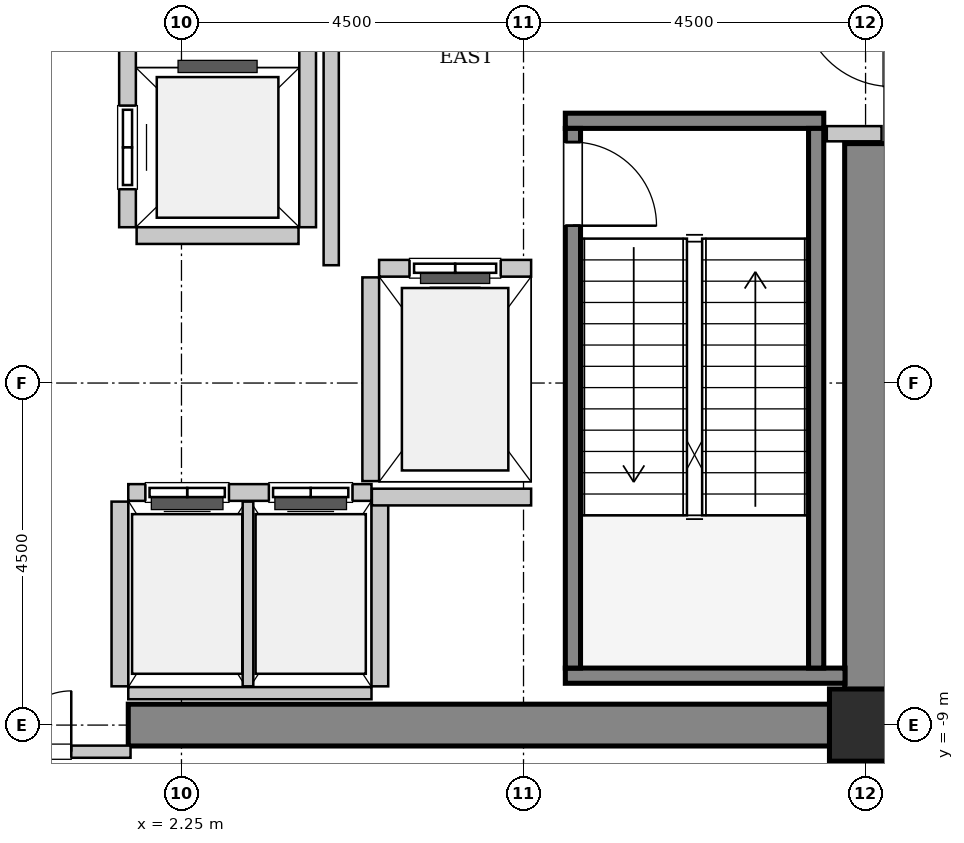
"""IFC4 building model, lengths in metres.
Left out: names, types, materials, properties, quantities, classifications, styles, units other than length and angle.
Written with IfcOpenShell. Run it as: python <this file> out.ifc"""

import sys

from ifc_helpers import new_model, si_unit, direction, frame, frame_2d, origin, origin_2d, place, context, subcontext, project, spatial, rectangle, hollow_rectangle, extrude, source, transform, mapped, element, fill, save


model = new_model("IFC4")
c1 = context("Model", 3, precision=1e-05, world=origin(), true_north=direction((0.0, 1.0)))
c2 = subcontext(c1, "Body", "Model", "MODEL_VIEW")
j1 = project(units=[si_unit("LENGTHUNIT", "METRE"), si_unit("PLANEANGLEUNIT", "RADIAN")], contexts=[c1])
p1 = place(None, origin())
s1 = spatial("IfcSite", under=j1, at=p1, CompositionType="ELEMENT")
p2 = place(p1, origin())
s2 = spatial("IfcBuilding", under=s1, at=p2, CompositionType="ELEMENT")
p3 = place(p2, frame((0.0, 0.0, 144.0)))
s3 = spatial("IfcBuildingStorey", under=s2, at=p3, CompositionType="ELEMENT", Elevation=144.0)
m1 = source(origin(), c2, "Body", "SweptSolid", [
    extrude(rectangle(XDim=9.975, YDim=0.55, at=frame_2d((4.987, 0.0))), origin(), (0.0, 0.0, 1.0), 4.8),
])
p4 = place(p3, frame((1.55, -9.0, 0.0), z_axis=(0.0, 0.0, 1.0), x_axis=(1.0, 0.0, 0.0)))
e1 = element("IfcWall", 1, at=p4, inside=s3, PredefinedType="SHEAR", context=c2, shape_type="MappedRepresentation", body=[
    mapped(m1, transform((0.0, 0.0, 0.0), x_axis=(1.0, 0.0, 0.0), y_axis=(0.0, 1.0, 0.0), z_axis=(0.0, 0.0, 1.0), scale=1.0)),
])
m2 = source(origin(), c2, "Body", "SweptSolid", [
    extrude(rectangle(XDim=7.375, YDim=0.55, at=frame_2d((3.688, 0.0))), origin(), (0.0, 0.0, 1.0), 4.8),
])
p5 = place(p3, frame((11.25, -8.725, 0.0), z_axis=(0.0, 0.0, 1.0), x_axis=(0.0, 1.0, 0.0)))
e2 = element("IfcWall", 2, at=p5, inside=s3, PredefinedType="SHEAR", context=c2, shape_type="MappedRepresentation", body=[
    mapped(m2, transform((0.0, 0.0, 0.0), x_axis=(1.0, 0.0, 0.0), y_axis=(0.0, 1.0, 0.0), z_axis=(0.0, 0.0, 1.0), scale=1.0)),
])
m3 = source(origin(), c2, "Body", "SweptSolid", [
    extrude(hollow_rectangle(XDim=0.95, YDim=0.95, WallThickness=0.045, InnerFilletRadius=0.045, OuterFilletRadius=0.09, at=origin_2d()), origin(), (0.0, 0.0, 1.0), 4.8),
])
p6 = place(p3, frame((11.25, -9.0, 0.0), z_axis=(0.0, 0.0, 1.0), x_axis=(1.0, 0.0, 0.0)))
e3 = element("IfcColumn", 3, at=p6, inside=s3, PredefinedType="COLUMN", context=c2, shape_type="MappedRepresentation", body=[
    mapped(m3, transform((0.0, 0.0, 0.0), x_axis=(1.0, 0.0, 0.0), y_axis=(0.0, 1.0, 0.0), z_axis=(0.0, 0.0, 1.0), scale=1.0)),
])
m4 = source(origin(), c2, "Body", "SweptSolid", [
    extrude(rectangle(XDim=3.4, YDim=0.2, at=frame_2d((1.7, 0.0))), origin(), (0.0, 0.0, 1.0), 4.8),
])
p7 = place(p3, frame((7.3, -1.05, 0.0), z_axis=(0.0, 0.0, 1.0), x_axis=(1.0, 0.0, 0.0)))
e4 = element("IfcWall", 4, at=p7, inside=s3, PredefinedType="SOLIDWALL", context=c2, shape_type="MappedRepresentation", body=[
    mapped(m4, transform((0.0, 0.0, 0.0), x_axis=(1.0, 0.0, 0.0), y_axis=(0.0, 1.0, 0.0), z_axis=(0.0, 0.0, 1.0), scale=1.0)),
])
m5 = source(origin(), c2, "Body", "SweptSolid", [
    extrude(rectangle(XDim=3.68, YDim=0.2, at=frame_2d((1.84, 0.0))), origin(), (0.0, 0.0, 1.0), 4.8),
])
p8 = place(p3, frame((7.3, -8.35, 0.0), z_axis=(0.0, 0.0, 1.0), x_axis=(1.0, 0.0, 0.0)))
e5 = element("IfcWall", 5, at=p8, inside=s3, PredefinedType="SOLIDWALL", context=c2, shape_type="MappedRepresentation", body=[
    mapped(m5, transform((0.0, 0.0, 0.0), x_axis=(1.0, 0.0, 0.0), y_axis=(0.0, 1.0, 0.0), z_axis=(0.0, 0.0, 1.0), scale=1.0)),
])
m6 = source(origin(), c2, "Body", "SweptSolid", [
    extrude(rectangle(XDim=7.1, YDim=0.2, at=frame_2d((3.55, 0.0))), origin(), (0.0, 0.0, 1.0), 4.8),
])
p9 = place(p3, frame((7.4, -1.15, 0.0), z_axis=(0.0, 0.0, 1.0), x_axis=(0.0, -1.0, 0.0)))
e6 = element("IfcWall", 6, at=p9, inside=s3, PredefinedType="SOLIDWALL", context=c2, shape_type="MappedRepresentation", body=[
    mapped(m6, transform((0.0, 0.0, 0.0), x_axis=(1.0, 0.0, 0.0), y_axis=(0.0, 1.0, 0.0), z_axis=(0.0, 0.0, 1.0), scale=1.0)),
])
p10 = place(p9, frame((0.18, 0.0, 0.0)))
e7 = element("IfcOpeningElement", 7, at=p10, cuts=e6, PredefinedType="OPENING", context=c2, shape_type="SweptSolid", body=[
    extrude(rectangle(XDim=1.1, YDim=2.15, at=frame_2d((0.55, 1.075))), frame((0.0, 0.11, 0.0), z_axis=(0.0, -1.0, 0.0), x_axis=(1.0, 0.0, 0.0)), (0.0, 0.0, 1.0), 0.22),
])
p11 = place(p3, frame((10.6, -1.15, 0.0), z_axis=(0.0, 0.0, 1.0), x_axis=(0.0, -1.0, 0.0)))
e8 = element("IfcWall", 8, at=p11, inside=s3, PredefinedType="SOLIDWALL", context=c2, shape_type="MappedRepresentation", body=[
    mapped(m6, transform((0.0, 0.0, 0.0), x_axis=(1.0, 0.0, 0.0), y_axis=(0.0, 1.0, 0.0), z_axis=(0.0, 0.0, 1.0), scale=1.0)),
])
m7 = source(origin(), c2, "Body", "SweptSolid", [
    extrude(rectangle(XDim=2.0, YDim=0.22, at=frame_2d((1.0, 0.0))), origin(), (0.0, 0.0, 1.0), 4.535),
])
p12 = place(p3, frame((6.85, -2.99, 0.0), z_axis=(0.0, 0.0, 1.0), x_axis=(-1.0, 0.0, 0.0)))
e9 = element("IfcWall", 9, at=p12, inside=s3, PredefinedType="SOLIDWALL", context=c2, shape_type="MappedRepresentation", body=[
    mapped(m7, transform((0.0, 0.0, 0.0), x_axis=(1.0, 0.0, 0.0), y_axis=(0.0, 1.0, 0.0), z_axis=(0.0, 0.0, 1.0), scale=1.0)),
])
p13 = place(p12, frame((0.4, 0.0, 0.0)))
e10 = element("IfcOpeningElement", 10, at=p13, cuts=e9, PredefinedType="OPENING", context=c2, shape_type="SweptSolid", body=[
    extrude(rectangle(XDim=1.2, YDim=2.2, at=frame_2d((0.6, 1.1))), frame((0.0, 0.12, 0.0), z_axis=(0.0, -1.0, 0.0), x_axis=(1.0, 0.0, 0.0)), (0.0, 0.0, 1.0), 0.24),
])
m8 = source(origin(), c2, "Body", "SweptSolid", [
    extrude(rectangle(XDim=2.68, YDim=0.22, at=frame_2d((1.34, 0.0))), origin(), (0.0, 0.0, 1.0), 4.535),
])
p14 = place(p3, frame((4.74, -3.11, 0.0), z_axis=(0.0, 0.0, 1.0), x_axis=(0.0, -1.0, 0.0)))
e11 = element("IfcWall", 11, at=p14, inside=s3, PredefinedType="SOLIDWALL", context=c2, shape_type="MappedRepresentation", body=[
    mapped(m8, transform((0.0, 0.0, 0.0), x_axis=(1.0, 0.0, 0.0), y_axis=(0.0, 1.0, 0.0), z_axis=(0.0, 0.0, 1.0), scale=1.0)),
])
m9 = source(origin(), c2, "Body", "SweptSolid", [
    extrude(rectangle(XDim=3.2, YDim=0.22, at=frame_2d((1.6, 0.0))), origin(), (0.0, 0.0, 1.0), 4.535),
])
p15 = place(p3, frame((4.75, -5.94, 0.0), z_axis=(0.0, 0.0, 1.0), x_axis=(-1.0, 0.0, 0.0)))
e12 = element("IfcWall", 12, at=p15, inside=s3, PredefinedType="SOLIDWALL", context=c2, shape_type="MappedRepresentation", body=[
    mapped(m9, transform((0.0, 0.0, 0.0), x_axis=(1.0, 0.0, 0.0), y_axis=(0.0, 1.0, 0.0), z_axis=(0.0, 0.0, 1.0), scale=1.0)),
])
p16 = place(p15, frame((1.875, 0.0, 0.0)))
e13 = element("IfcOpeningElement", 13, at=p16, cuts=e12, PredefinedType="OPENING", context=c2, shape_type="SweptSolid", body=[
    extrude(rectangle(XDim=1.1, YDim=2.2, at=frame_2d((0.55, 1.1))), frame((0.0, 0.12, 0.0), z_axis=(0.0, -1.0, 0.0), x_axis=(1.0, 0.0, 0.0)), (0.0, 0.0, 1.0), 0.24),
])
p17 = place(p15, frame((0.25, 0.0, 0.0)))
e14 = element("IfcOpeningElement", 14, at=p17, cuts=e12, PredefinedType="OPENING", context=c2, shape_type="SweptSolid", body=[
    extrude(rectangle(XDim=1.1, YDim=2.2, at=frame_2d((0.55, 1.1))), frame((0.0, 0.12, 0.0), z_axis=(0.0, -1.0, 0.0), x_axis=(1.0, 0.0, 0.0)), (0.0, 0.0, 1.0), 0.24),
])
m10 = source(origin(), c2, "Body", "SweptSolid", [
    extrude(rectangle(XDim=3.2, YDim=0.16, at=frame_2d((1.6, 0.0))), origin(), (0.0, 0.0, 1.0), 3.425),
])
p18 = place(p3, frame((1.55, -8.58, 0.0), z_axis=(0.0, 0.0, 1.0), x_axis=(1.0, 0.0, 0.0)))
e15 = element("IfcWall", 15, at=p18, inside=s3, PredefinedType="PARTITIONING", context=c2, shape_type="MappedRepresentation", body=[
    mapped(m10, transform((0.0, 0.0, 0.0), x_axis=(1.0, 0.0, 0.0), y_axis=(0.0, 1.0, 0.0), z_axis=(0.0, 0.0, 1.0), scale=1.0)),
])
m11 = source(origin(), c2, "Body", "SweptSolid", [
    extrude(rectangle(XDim=2.43, YDim=0.22, at=frame_2d((1.215, 0.0))), origin(), (0.0, 0.0, 1.0), 4.535),
])
p19 = place(p3, frame((1.44, -6.06, 0.0), z_axis=(0.0, 0.0, 1.0), x_axis=(0.0, -1.0, 0.0)))
e16 = element("IfcWall", 16, at=p19, inside=s3, PredefinedType="SOLIDWALL", context=c2, shape_type="MappedRepresentation", body=[
    mapped(m11, transform((0.0, 0.0, 0.0), x_axis=(1.0, 0.0, 0.0), y_axis=(0.0, 1.0, 0.0), z_axis=(0.0, 0.0, 1.0), scale=1.0)),
])
m12 = source(origin(), c2, "Body", "SweptSolid", [
    extrude(rectangle(XDim=2.43, YDim=0.14, at=frame_2d((1.215, 0.0))), origin(), (0.0, 0.0, 1.0), 4.535),
])
p20 = place(p3, frame((3.125, -8.49, 0.0), z_axis=(0.0, 0.0, 1.0), x_axis=(0.0, 1.0, 0.0)))
e17 = element("IfcWall", 17, at=p20, inside=s3, PredefinedType="PARTITIONING", context=c2, shape_type="MappedRepresentation", body=[
    mapped(m12, transform((0.0, 0.0, 0.0), x_axis=(1.0, 0.0, 0.0), y_axis=(0.0, 1.0, 0.0), z_axis=(0.0, 0.0, 1.0), scale=1.0)),
])
p21 = place(p3, frame((4.86, -8.49, 0.0), z_axis=(0.0, 0.0, 1.0), x_axis=(0.0, 1.0, 0.0)))
e18 = element("IfcWall", 18, at=p21, inside=s3, PredefinedType="SOLIDWALL", context=c2, shape_type="MappedRepresentation", body=[
    mapped(m11, transform((0.0, 0.0, 0.0), x_axis=(1.0, 0.0, 0.0), y_axis=(0.0, 1.0, 0.0), z_axis=(0.0, 0.0, 1.0), scale=1.0)),
])
m13 = source(origin(), c2, "Body", "SweptSolid", [
    extrude(rectangle(XDim=4.9, YDim=0.22, at=frame_2d((2.45, 0.0))), origin(), (0.0, 0.0, 1.0), 4.535),
])
p22 = place(p3, frame((1.54, 2.45, 0.0), z_axis=(0.0, 0.0, 1.0), x_axis=(0.0, -1.0, 0.0)))
e19 = element("IfcWall", 19, at=p22, inside=s3, PredefinedType="SOLIDWALL", context=c2, shape_type="MappedRepresentation", body=[
    mapped(m13, transform((0.0, 0.0, 0.0), x_axis=(1.0, 0.0, 0.0), y_axis=(0.0, 1.0, 0.0), z_axis=(0.0, 0.0, 1.0), scale=1.0)),
])
p23 = place(p22, frame((3.3, 0.0, 0.0)))
e20 = element("IfcOpeningElement", 20, at=p23, cuts=e19, PredefinedType="OPENING", context=c2, shape_type="SweptSolid", body=[
    extrude(rectangle(XDim=1.1, YDim=2.2, at=frame_2d((0.55, 1.1))), frame((0.0, 0.12, 0.0), z_axis=(0.0, -1.0, 0.0), x_axis=(1.0, 0.0, 0.0)), (0.0, 0.0, 1.0), 0.24),
])
p24 = place(p22, frame((0.5, 0.0, 0.0)))
e21 = element("IfcOpeningElement", 21, at=p24, cuts=e19, PredefinedType="OPENING", context=c2, shape_type="SweptSolid", body=[
    extrude(rectangle(XDim=1.1, YDim=2.2, at=frame_2d((0.55, 1.1))), frame((0.0, 0.12, 0.0), z_axis=(0.0, -1.0, 0.0), x_axis=(1.0, 0.0, 0.0)), (0.0, 0.0, 1.0), 0.24),
])
p25 = place(p3, frame((3.91, -2.45, 0.0), z_axis=(0.0, 0.0, 1.0), x_axis=(0.0, 1.0, 0.0)))
e22 = element("IfcWall", 22, at=p25, inside=s3, PredefinedType="SOLIDWALL", context=c2, shape_type="MappedRepresentation", body=[
    mapped(m13, transform((0.0, 0.0, 0.0), x_axis=(1.0, 0.0, 0.0), y_axis=(0.0, 1.0, 0.0), z_axis=(0.0, 0.0, 1.0), scale=1.0)),
])
m14 = source(origin(), c2, "Body", "SweptSolid", [
    extrude(rectangle(XDim=2.13, YDim=0.22, at=frame_2d((1.065, 0.0))), origin(), (0.0, 0.0, 1.0), 4.535),
])
p26 = place(p3, frame((1.66, -2.56, 0.0), z_axis=(0.0, 0.0, 1.0), x_axis=(1.0, 0.0, 0.0)))
e23 = element("IfcWall", 23, at=p26, inside=s3, PredefinedType="SOLIDWALL", context=c2, shape_type="MappedRepresentation", body=[
    mapped(m14, transform((0.0, 0.0, 0.0), x_axis=(1.0, 0.0, 0.0), y_axis=(0.0, 1.0, 0.0), z_axis=(0.0, 0.0, 1.0), scale=1.0)),
])
m15 = source(origin(), c2, "Body", "SweptSolid", [
    extrude(rectangle(XDim=2.095, YDim=0.22, at=frame_2d((1.048, 0.0))), origin(), (0.0, 0.0, 1.0), 4.535),
])
p27 = place(p3, frame((4.755, -6.0, 0.0), z_axis=(0.0, 0.0, 1.0), x_axis=(1.0, 0.0, 0.0)))
e24 = element("IfcWall", 24, at=p27, inside=s3, PredefinedType="SOLIDWALL", context=c2, shape_type="MappedRepresentation", body=[
    mapped(m15, transform((0.0, 0.0, 0.0), x_axis=(1.0, 0.0, 0.0), y_axis=(0.0, 1.0, 0.0), z_axis=(0.0, 0.0, 1.0), scale=1.0)),
])
m16 = source(origin(), c2, "Body", "SweptSolid", [
    extrude(rectangle(XDim=5.9, YDim=0.2, at=frame_2d((2.95, 0.0))), origin(), (0.0, 0.0, 1.0), 4.535),
])
p28 = place(p3, frame((4.22, -2.95, 0.0), z_axis=(0.0, 0.0, 1.0), x_axis=(0.0, 1.0, 0.0)))
e25 = element("IfcWall", 25, at=p28, inside=s3, PredefinedType="PARTITIONING", context=c2, shape_type="MappedRepresentation", body=[
    mapped(m16, transform((0.0, 0.0, 0.0), x_axis=(1.0, 0.0, 0.0), y_axis=(0.0, 1.0, 0.0), z_axis=(0.0, 0.0, 1.0), scale=1.0)),
])
m17 = source(origin(), c2, "Body", "SweptSolid", [
    extrude(rectangle(XDim=0.72, YDim=0.2, at=frame_2d((0.36, 0.0))), origin(), (0.0, 0.0, 1.0), 4.535),
])
p29 = place(p3, frame((10.74, -1.22, 0.0), z_axis=(0.0, 0.0, 1.0), x_axis=(1.0, 0.0, 0.0)))
e26 = element("IfcWall", 26, at=p29, inside=s3, PredefinedType="PARTITIONING", context=c2, shape_type="MappedRepresentation", body=[
    mapped(m17, transform((0.0, 0.0, 0.0), x_axis=(1.0, 0.0, 0.0), y_axis=(0.0, 1.0, 0.0), z_axis=(0.0, 0.0, 1.0), scale=1.0)),
])
m18 = source(origin(), c2, "Body", "SweptSolid", [
    extrude(rectangle(XDim=3.16, YDim=0.16, at=frame_2d((1.58, 0.0))), origin(), (0.0, 0.0, 1.0), 3.425),
])
p30 = place(p3, frame((-1.58, -9.35, 0.0), z_axis=(0.0, 0.0, 1.0), x_axis=(1.0, 0.0, 0.0)))
e27 = element("IfcWall", 27, at=p30, inside=s3, PredefinedType="PARTITIONING", context=c2, shape_type="MappedRepresentation", body=[
    mapped(m18, transform((0.0, 0.0, 0.0), x_axis=(1.0, 0.0, 0.0), y_axis=(0.0, 1.0, 0.0), z_axis=(0.0, 0.0, 1.0), scale=1.0)),
])
p31 = place(p30, frame((0.78, 0.0, 0.0)))
e28 = element("IfcOpeningElement", 28, at=p31, cuts=e27, PredefinedType="OPENING", context=c2, shape_type="SweptSolid", body=[
    extrude(rectangle(XDim=1.6, YDim=2.3, at=frame_2d((0.8, 1.15))), frame((0.0, 0.09, 0.0), z_axis=(0.0, -1.0, 0.0), x_axis=(1.0, 0.0, 0.0)), (0.0, 0.0, 1.0), 0.18),
])
m19 = source(origin(), c2, "Body", "SweptSolid", [
    extrude(rectangle(XDim=1.1, YDim=2.15, at=frame_2d((0.55, 1.075))), frame((0.0, 0.025, 0.0), z_axis=(0.0, -1.0, 0.0), x_axis=(1.0, 0.0, 0.0)), (0.0, 0.0, 1.0), 0.05),
])
p32 = place(p10, origin())
e29 = element("IfcDoor", 29, at=p32, inside=s3, OperationType="SINGLE_SWING_RIGHT", PredefinedType="DOOR", context=c2, shape_type="MappedRepresentation", body=[
    mapped(m19, transform((0.0, 0.0, 0.0), x_axis=(1.0, 0.0, 0.0), y_axis=(0.0, 1.0, 0.0), z_axis=(0.0, 0.0, 1.0), scale=1.0)),
])
fill(e7, e29)
m20 = source(origin(), c2, "Body", "SweptSolid", [
    extrude(rectangle(XDim=1.2, YDim=2.2, at=frame_2d((0.6, 1.1))), frame((0.0, 0.025, 0.0), z_axis=(0.0, -1.0, 0.0), x_axis=(1.0, 0.0, 0.0)), (0.0, 0.0, 1.0), 0.05),
])
p33 = place(p13, origin())
e30 = element("IfcDoor", 30, at=p33, inside=s3, OperationType="SLIDING_TO_LEFT", PredefinedType="DOOR", context=c2, shape_type="MappedRepresentation", body=[
    mapped(m20, transform((0.0, 0.0, 0.0), x_axis=(1.0, 0.0, 0.0), y_axis=(0.0, 1.0, 0.0), z_axis=(0.0, 0.0, 1.0), scale=1.0)),
])
fill(e10, e30)
m21 = source(origin(), c2, "Body", "SweptSolid", [
    extrude(rectangle(XDim=1.1, YDim=2.2, at=frame_2d((0.55, 1.1))), frame((0.0, 0.025, 0.0), z_axis=(0.0, -1.0, 0.0), x_axis=(1.0, 0.0, 0.0)), (0.0, 0.0, 1.0), 0.05),
])
p34 = place(p16, origin())
e31 = element("IfcDoor", 31, at=p34, inside=s3, OperationType="DOUBLE_DOOR_SLIDING", PredefinedType="DOOR", context=c2, shape_type="MappedRepresentation", body=[
    mapped(m21, transform((0.0, 0.0, 0.0), x_axis=(1.0, 0.0, 0.0), y_axis=(0.0, 1.0, 0.0), z_axis=(0.0, 0.0, 1.0), scale=1.0)),
])
fill(e13, e31)
p35 = place(p17, origin())
e32 = element("IfcDoor", 32, at=p35, inside=s3, OperationType="DOUBLE_DOOR_SLIDING", PredefinedType="DOOR", context=c2, shape_type="MappedRepresentation", body=[
    mapped(m21, transform((0.0, 0.0, 0.0), x_axis=(1.0, 0.0, 0.0), y_axis=(0.0, 1.0, 0.0), z_axis=(0.0, 0.0, 1.0), scale=1.0)),
])
fill(e14, e32)
p36 = place(p23, origin())
e33 = element("IfcDoor", 33, at=p36, inside=s3, OperationType="DOUBLE_DOOR_SLIDING", PredefinedType="DOOR", context=c2, shape_type="MappedRepresentation", body=[
    mapped(m21, transform((0.0, 0.0, 0.0), x_axis=(1.0, 0.0, 0.0), y_axis=(0.0, 1.0, 0.0), z_axis=(0.0, 0.0, 1.0), scale=1.0)),
])
fill(e20, e33)
m22 = source(origin(), c2, "Body", "SweptSolid", [
    extrude(rectangle(XDim=1.6, YDim=2.3, at=frame_2d((0.8, 1.15))), frame((0.0, 0.025, 0.0), z_axis=(0.0, -1.0, 0.0), x_axis=(1.0, 0.0, 0.0)), (0.0, 0.0, 1.0), 0.05),
])
p37 = place(p31, origin())
e34 = element("IfcDoor", 34, at=p37, inside=s3, OperationType="DOUBLE_DOOR_SINGLE_SWING", PredefinedType="DOOR", context=c2, shape_type="MappedRepresentation", body=[
    mapped(m22, transform((0.0, 0.0, 0.0), x_axis=(1.0, 0.0, 0.0), y_axis=(0.0, 1.0, 0.0), z_axis=(0.0, 0.0, 1.0), scale=1.0)),
])
fill(e28, e34)
save(model, sys.argv[1])
